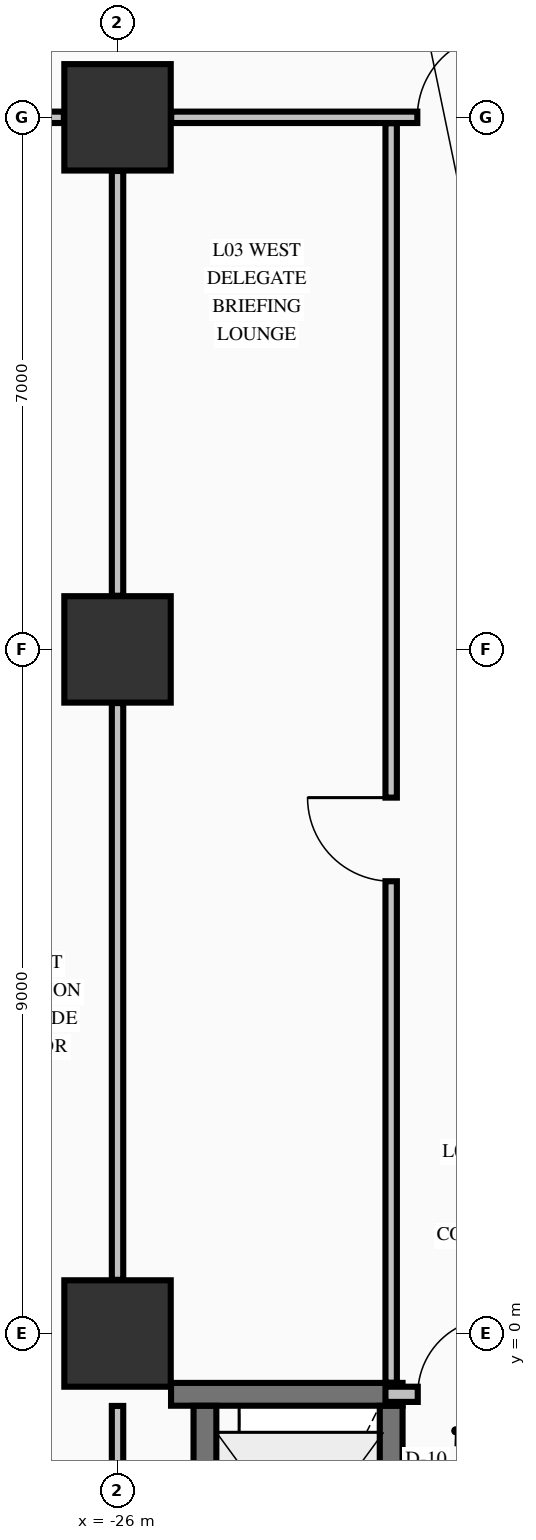
"""IFC4 building model, lengths in metres.
Left out: names, types, materials, properties, quantities, classifications, styles, units other than length and angle.
Written with IfcOpenShell. Run it as: python <this file> out.ifc"""

import sys

from ifc_helpers import new_model, si_unit, direction, frame, frame_2d, origin, origin_2d, place, context, subcontext, project, spatial, rectangle, extrude, element, fill, save


model = new_model("IFC4")
c1 = context("Model", 3, precision=1e-05, world=origin(), true_north=direction((0.0, 1.0)))
c2 = subcontext(c1, "Body", "Model", "MODEL_VIEW")
j1 = project(units=[si_unit("LENGTHUNIT", "METRE"), si_unit("PLANEANGLEUNIT", "RADIAN")], contexts=[c1])
p1 = place(None, origin())
s1 = spatial("IfcSite", under=j1, at=p1, CompositionType="ELEMENT")
p2 = place(p1, origin())
s2 = spatial("IfcBuilding", under=s1, at=p2, CompositionType="ELEMENT")
p3 = place(p2, frame((0.0, 0.0, 16.32)))
s3 = spatial("IfcBuildingStorey", under=s2, at=p3, CompositionType="ELEMENT", Elevation=16.32)
for number, where, z_axis, x_axis in (
    (1, (-26.0, 0.0, 0.0), (0.0, 0.0, 1.0), (1.0, 0.0, 0.0)),
    (2, (-26.0, 9.0, 0.0), (0.0, 0.0, 1.0), (1.0, 0.0, 0.0)),
    (3, (-26.0, 16.0, 0.0), (0.0, 0.0, 1.0), (1.0, 0.0, 0.0)),
):
    element("IfcColumn", number, at=place(p3, frame(where, z_axis=z_axis, x_axis=x_axis)), inside=s3, PredefinedType="COLUMN", context=c2, shape_type="SweptSolid", body=[
        extrude(rectangle(XDim=1.4, YDim=1.4, at=origin_2d()), origin(), (0.0, 0.0, 1.0), 4.99),
    ])
p4 = place(p3, frame((-25.296, -0.8, 0.0), z_axis=(0.0, 0.0, 1.0), x_axis=(1.0, 0.0, 0.0)))
e4 = element("IfcWall", 4, at=p4, inside=s3, PredefinedType="SHEAR", context=c2, shape_type="SweptSolid", body=[
    extrude(rectangle(XDim=3.046, YDim=0.3, at=frame_2d((1.523, 0.0))), origin(), (0.0, 0.0, 1.0), 4.99),
])
p5 = place(p3, frame((-22.475, -0.8, 0.0), z_axis=(0.0, 0.0, 1.0), x_axis=(1.0, 0.0, 0.0)))
e5 = element("IfcWall", 5, at=p5, inside=s3, PredefinedType="PARTITIONING", context=c2, shape_type="SweptSolid", body=[
    extrude(rectangle(XDim=1.669, YDim=0.2, at=frame_2d((0.834, 0.0))), origin(), (0.0, 0.0, 1.0), 4.99),
])
p6 = place(p5, frame((0.425, 0.0, 0.0)))
e6 = element("IfcOpeningElement", 6, at=p6, cuts=e5, PredefinedType="OPENING", context=c2, shape_type="SweptSolid", body=[
    extrude(rectangle(XDim=1.0, YDim=2.15, at=frame_2d((0.5, 1.075))), frame((0.0, 0.11, 0.0), z_axis=(0.0, -1.0, 0.0), x_axis=(1.0, 0.0, 0.0)), (0.0, 0.0, 1.0), 0.22),
])
p7 = place(p3, frame((-28.875, 16.0, 0.0), z_axis=(0.0, 0.0, 1.0), x_axis=(1.0, 0.0, 0.0)))
e7 = element("IfcWall", 7, at=p7, inside=s3, PredefinedType="PARTITIONING", context=c2, shape_type="SweptSolid", body=[
    extrude(rectangle(XDim=2.169, YDim=0.15, at=frame_2d((1.084, 0.0))), origin(), (0.0, 0.0, 1.0), 3.332),
])
p8 = place(p7, frame((0.6, 0.0, 0.0)))
e8 = element("IfcOpeningElement", 8, at=p8, cuts=e7, PredefinedType="OPENING", context=c2, shape_type="SweptSolid", body=[
    extrude(rectangle(XDim=1.05, YDim=2.15, at=frame_2d((0.525, 1.075))), frame((0.0, 0.085, 0.0), z_axis=(0.0, -1.0, 0.0), x_axis=(1.0, 0.0, 0.0)), (0.0, 0.0, 1.0), 0.17),
])
p9 = place(p3, frame((-25.294, 16.0, 0.0), z_axis=(0.0, 0.0, 1.0), x_axis=(1.0, 0.0, 0.0)))
e9 = element("IfcWall", 9, at=p9, inside=s3, PredefinedType="PARTITIONING", context=c2, shape_type="SweptSolid", body=[
    extrude(rectangle(XDim=4.488, YDim=0.15, at=frame_2d((2.244, 0.0))), origin(), (0.0, 0.0, 1.0), 3.332),
])
p10 = place(p9, frame((3.238, 0.0, 0.0)))
e10 = element("IfcOpeningElement", 10, at=p10, cuts=e9, PredefinedType="OPENING", context=c2, shape_type="SweptSolid", body=[
    extrude(rectangle(XDim=1.1, YDim=2.15, at=frame_2d((0.55, 1.075))), frame((0.0, 0.085, 0.0), z_axis=(0.0, -1.0, 0.0), x_axis=(1.0, 0.0, 0.0)), (0.0, 0.0, 1.0), 0.17),
])
p11 = place(p3, frame((-24.85, -4.648, 0.0), z_axis=(0.0, 0.0, 1.0), x_axis=(0.0, 1.0, 0.0)))
e11 = element("IfcWall", 11, at=p11, inside=s3, PredefinedType="SHEAR", context=c2, shape_type="SweptSolid", body=[
    extrude(rectangle(XDim=3.696, YDim=0.3, at=frame_2d((1.848, 0.0))), origin(), (0.0, 0.0, 1.0), 4.99),
])
p12 = place(p3, frame((-22.4, -4.648, 0.0), z_axis=(0.0, 0.0, 1.0), x_axis=(0.0, 1.0, 0.0)))
e12 = element("IfcWall", 12, at=p12, inside=s3, PredefinedType="SHEAR", context=c2, shape_type="SweptSolid", body=[
    extrude(rectangle(XDim=3.696, YDim=0.3, at=frame_2d((1.848, 0.0))), origin(), (0.0, 0.0, 1.0), 4.99),
])
p13 = place(p12, frame((1.198, 0.0, 0.0)))
e13 = element("IfcOpeningElement", 13, at=p13, cuts=e12, PredefinedType="OPENING", context=c2, shape_type="SweptSolid", body=[
    extrude(rectangle(XDim=1.3, YDim=2.3, at=frame_2d((0.65, 1.15))), frame((0.0, 0.16, 0.0), z_axis=(0.0, -1.0, 0.0), x_axis=(1.0, 0.0, 0.0)), (0.0, 0.0, 1.0), 0.32),
])
p14 = place(p3, frame((-26.0, -8.294, 0.0), z_axis=(0.0, 0.0, 1.0), x_axis=(0.0, 1.0, 0.0)))
e14 = element("IfcWall", 14, at=p14, inside=s3, PredefinedType="PARTITIONING", context=c2, shape_type="SweptSolid", body=[
    extrude(rectangle(XDim=7.341, YDim=0.15, at=frame_2d((3.67, 0.0))), origin(), (0.0, 0.0, 1.0), 3.332),
])
p15 = place(p3, frame((-26.0, 0.706, 0.0), z_axis=(0.0, 0.0, 1.0), x_axis=(0.0, 1.0, 0.0)))
e15 = element("IfcWall", 15, at=p15, inside=s3, PredefinedType="PARTITIONING", context=c2, shape_type="SweptSolid", body=[
    extrude(rectangle(XDim=7.588, YDim=0.15, at=frame_2d((3.794, 0.0))), origin(), (0.0, 0.0, 1.0), 3.332),
])
p16 = place(p3, frame((-26.0, 9.706, 0.0), z_axis=(0.0, 0.0, 1.0), x_axis=(0.0, 1.0, 0.0)))
e16 = element("IfcWall", 16, at=p16, inside=s3, PredefinedType="PARTITIONING", context=c2, shape_type="SweptSolid", body=[
    extrude(rectangle(XDim=5.588, YDim=0.15, at=frame_2d((2.794, 0.0))), origin(), (0.0, 0.0, 1.0), 3.332),
])
p17 = place(p3, frame((-22.4, -0.647, 0.0), z_axis=(0.0, 0.0, 1.0), x_axis=(0.0, 1.0, 0.0)))
e17 = element("IfcWall", 17, at=p17, inside=s3, PredefinedType="PARTITIONING", context=c2, shape_type="SweptSolid", body=[
    extrude(rectangle(XDim=16.569, YDim=0.15, at=frame_2d((8.285, 0.0))), origin(), (0.0, 0.0, 1.0), 4.99),
])
p18 = place(p17, frame((6.597, 0.0, 0.0)))
e18 = element("IfcOpeningElement", 18, at=p18, cuts=e17, PredefinedType="OPENING", context=c2, shape_type="SweptSolid", body=[
    extrude(rectangle(XDim=1.1, YDim=2.15, at=frame_2d((0.55, 1.075))), frame((0.0, 0.085, 0.0), z_axis=(0.0, -1.0, 0.0), x_axis=(1.0, 0.0, 0.0)), (0.0, 0.0, 1.0), 0.17),
])
p19 = place(p6, origin())
e19 = element("IfcDoor", 19, at=p19, inside=s3, OperationType="SINGLE_SWING_RIGHT", PredefinedType="DOOR", context=c2, shape_type="SweptSolid", body=[
    extrude(rectangle(XDim=1.0, YDim=2.15, at=frame_2d((0.5, 1.075))), frame((0.0, 0.025, 0.0), z_axis=(0.0, -1.0, 0.0), x_axis=(1.0, 0.0, 0.0)), (0.0, 0.0, 1.0), 0.05),
])
fill(e6, e19)
p20 = place(p18, origin())
e20 = element("IfcDoor", 20, at=p20, inside=s3, OperationType="SINGLE_SWING_RIGHT", PredefinedType="DOOR", context=c2, shape_type="SweptSolid", body=[
    extrude(rectangle(XDim=1.1, YDim=2.15, at=frame_2d((0.55, 1.075))), frame((0.0, 0.025, 0.0), z_axis=(0.0, -1.0, 0.0), x_axis=(1.0, 0.0, 0.0)), (0.0, 0.0, 1.0), 0.05),
])
fill(e18, e20)
p21 = place(p10, origin())
e21 = element("IfcDoor", 21, at=p21, inside=s3, OperationType="SINGLE_SWING_RIGHT", PredefinedType="DOOR", context=c2, shape_type="SweptSolid", body=[
    extrude(rectangle(XDim=1.1, YDim=2.15, at=frame_2d((0.55, 1.075))), frame((0.0, 0.025, 0.0), z_axis=(0.0, -1.0, 0.0), x_axis=(1.0, 0.0, 0.0)), (0.0, 0.0, 1.0), 0.05),
])
fill(e10, e21)
save(model, sys.argv[1])
